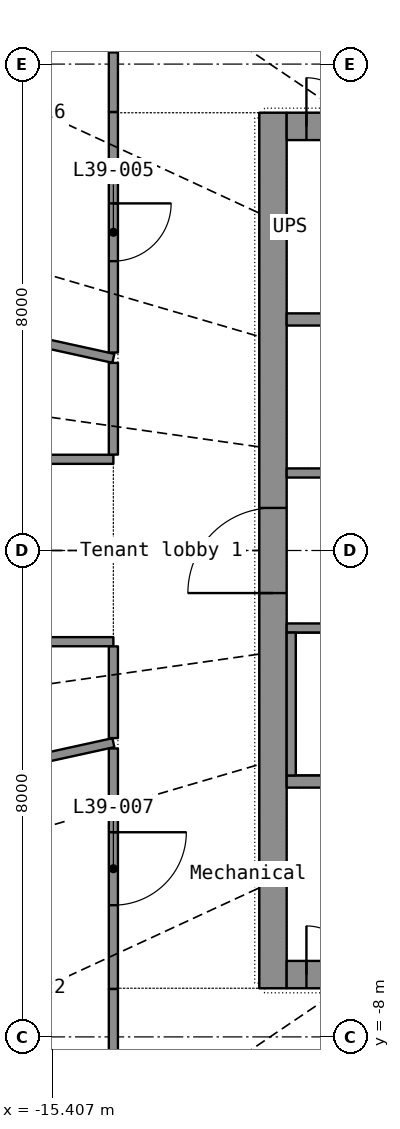
"""IFC4 building model, lengths in metres.
Left out: names, types, materials, properties, quantities, classifications, styles, units other than length and angle.
Written with IfcOpenShell. Run it as: python <this file> out.ifc"""

import sys

from ifc_helpers import new_model, si_unit, direction, frame, frame_2d, origin, place, context, subcontext, project, spatial, rectangle, extrude, element, fill, save


model = new_model("IFC4")
c1 = context("Model", 3, precision=1e-05, world=origin(), true_north=direction((0.0, 1.0)))
c2 = subcontext(c1, "Body", "Model", "MODEL_VIEW")
j1 = project(units=[si_unit("LENGTHUNIT", "METRE"), si_unit("PLANEANGLEUNIT", "RADIAN")], contexts=[c1])
p1 = place(None, origin())
s1 = spatial("IfcSite", under=j1, at=p1, CompositionType="ELEMENT")
p2 = place(p1, origin())
s2 = spatial("IfcBuilding", under=s1, at=p2, CompositionType="ELEMENT")
p3 = place(p2, frame((0.0, 0.0, 164.5)))
s3 = spatial("IfcBuildingStorey", under=s2, at=p3, CompositionType="ELEMENT", Elevation=164.5)
p4 = place(p3, frame((-11.775, -7.2, 0.0), z_axis=(0.0, 0.0, 1.0), x_axis=(0.0, 1.0, 0.0)))
e1 = element("IfcWall", 1, at=p4, inside=s3, PredefinedType="SHEAR", context=c2, shape_type="SweptSolid", body=[
    extrude(rectangle(XDim=14.4, YDim=0.45, at=frame_2d((7.2, 0.0))), origin(), (0.0, 0.0, 1.0), 3.3),
])
p5 = place(p4, frame((6.5, 0.0, 0.0)))
e2 = element("IfcOpeningElement", 2, at=p5, cuts=e1, PredefinedType="OPENING", context=c2, shape_type="SweptSolid", body=[
    extrude(rectangle(XDim=1.4, YDim=2.2, at=frame_2d((0.7, 1.1))), frame((0.0, 0.235, 0.0), z_axis=(0.0, -1.0, 0.0), x_axis=(1.0, 0.0, 0.0)), (0.0, 0.0, 1.0), 0.47),
])
p6 = place(p3, frame((-11.55, -6.975, 0.0), z_axis=(0.0, 0.0, 1.0), x_axis=(1.0, 0.0, 0.0)))
e3 = element("IfcWall", 3, at=p6, inside=s3, PredefinedType="SHEAR", context=c2, shape_type="SweptSolid", body=[
    extrude(rectangle(XDim=23.1, YDim=0.45, at=frame_2d((11.55, 0.0))), origin(), (0.0, 0.0, 1.0), 3.3),
])
p7 = place(p6, frame((20.0, 0.0, 0.0)))
e4 = element("IfcOpeningElement", 4, at=p7, cuts=e3, PredefinedType="OPENING", context=c2, shape_type="SweptSolid", body=[
    extrude(rectangle(XDim=1.1, YDim=2.2, at=frame_2d((0.55, 1.1))), frame((0.0, 0.235, 0.0), z_axis=(0.0, -1.0, 0.0), x_axis=(1.0, 0.0, 0.0)), (0.0, 0.0, 1.0), 0.47),
])
p8 = place(p6, frame((3.1, 0.0, 0.0)))
e5 = element("IfcOpeningElement", 5, at=p8, cuts=e3, PredefinedType="OPENING", context=c2, shape_type="SweptSolid", body=[
    extrude(rectangle(XDim=0.9, YDim=2.1, at=frame_2d((0.45, 1.05))), frame((0.0, 0.235, 0.0), z_axis=(0.0, -1.0, 0.0), x_axis=(1.0, 0.0, 0.0)), (0.0, 0.0, 1.0), 0.47),
])
p9 = place(p6, frame((9.1, 0.0, 0.0)))
e6 = element("IfcOpeningElement", 6, at=p9, cuts=e3, PredefinedType="OPENING", context=c2, shape_type="SweptSolid", body=[
    extrude(rectangle(XDim=0.9, YDim=2.1, at=frame_2d((0.45, 1.05))), frame((0.0, 0.235, 0.0), z_axis=(0.0, -1.0, 0.0), x_axis=(1.0, 0.0, 0.0)), (0.0, 0.0, 1.0), 0.47),
])
p10 = place(p6, frame((16.1, 0.0, 0.0)))
e7 = element("IfcOpeningElement", 7, at=p10, cuts=e3, PredefinedType="OPENING", context=c2, shape_type="SweptSolid", body=[
    extrude(rectangle(XDim=0.9, YDim=2.1, at=frame_2d((0.45, 1.05))), frame((0.0, 0.235, 0.0), z_axis=(0.0, -1.0, 0.0), x_axis=(1.0, 0.0, 0.0)), (0.0, 0.0, 1.0), 0.47),
])
p11 = place(p6, frame((0.325, 0.0, 0.0)))
e8 = element("IfcOpeningElement", 8, at=p11, cuts=e3, PredefinedType="OPENING", context=c2, shape_type="SweptSolid", body=[
    extrude(rectangle(XDim=0.8, YDim=2.05, at=frame_2d((0.4, 1.025))), frame((0.0, 0.235, 0.0), z_axis=(0.0, -1.0, 0.0), x_axis=(1.0, 0.0, 0.0)), (0.0, 0.0, 1.0), 0.47),
])
p12 = place(p6, frame((21.975, 0.0, 0.0)))
e9 = element("IfcOpeningElement", 9, at=p12, cuts=e3, PredefinedType="OPENING", context=c2, shape_type="SweptSolid", body=[
    extrude(rectangle(XDim=0.8, YDim=2.05, at=frame_2d((0.4, 1.025))), frame((0.0, 0.235, 0.0), z_axis=(0.0, -1.0, 0.0), x_axis=(1.0, 0.0, 0.0)), (0.0, 0.0, 1.0), 0.47),
])
p13 = place(p3, frame((-11.55, 6.975, 0.0), z_axis=(0.0, 0.0, 1.0), x_axis=(1.0, 0.0, 0.0)))
e10 = element("IfcWall", 10, at=p13, inside=s3, PredefinedType="SHEAR", context=c2, shape_type="SweptSolid", body=[
    extrude(rectangle(XDim=23.1, YDim=0.45, at=frame_2d((11.55, 0.0))), origin(), (0.0, 0.0, 1.0), 3.3),
])
p14 = place(p13, frame((2.0, 0.0, 0.0)))
e11 = element("IfcOpeningElement", 11, at=p14, cuts=e10, PredefinedType="OPENING", context=c2, shape_type="SweptSolid", body=[
    extrude(rectangle(XDim=1.1, YDim=2.2, at=frame_2d((0.55, 1.1))), frame((0.0, 0.235, 0.0), z_axis=(0.0, -1.0, 0.0), x_axis=(1.0, 0.0, 0.0)), (0.0, 0.0, 1.0), 0.47),
])
p15 = place(p13, frame((6.0, 0.0, 0.0)))
e12 = element("IfcOpeningElement", 12, at=p15, cuts=e10, PredefinedType="OPENING", context=c2, shape_type="SweptSolid", body=[
    extrude(rectangle(XDim=1.1, YDim=2.2, at=frame_2d((0.55, 1.1))), frame((0.0, 0.235, 0.0), z_axis=(0.0, -1.0, 0.0), x_axis=(1.0, 0.0, 0.0)), (0.0, 0.0, 1.0), 0.47),
])
p16 = place(p13, frame((8.0, 0.0, 0.0)))
e13 = element("IfcOpeningElement", 13, at=p16, cuts=e10, PredefinedType="OPENING", context=c2, shape_type="SweptSolid", body=[
    extrude(rectangle(XDim=1.1, YDim=2.2, at=frame_2d((0.55, 1.1))), frame((0.0, 0.235, 0.0), z_axis=(0.0, -1.0, 0.0), x_axis=(1.0, 0.0, 0.0)), (0.0, 0.0, 1.0), 0.47),
])
p17 = place(p13, frame((10.0, 0.0, 0.0)))
e14 = element("IfcOpeningElement", 14, at=p17, cuts=e10, PredefinedType="OPENING", context=c2, shape_type="SweptSolid", body=[
    extrude(rectangle(XDim=1.1, YDim=2.2, at=frame_2d((0.55, 1.1))), frame((0.0, 0.235, 0.0), z_axis=(0.0, -1.0, 0.0), x_axis=(1.0, 0.0, 0.0)), (0.0, 0.0, 1.0), 0.47),
])
p18 = place(p13, frame((12.0, 0.0, 0.0)))
e15 = element("IfcOpeningElement", 15, at=p18, cuts=e10, PredefinedType="OPENING", context=c2, shape_type="SweptSolid", body=[
    extrude(rectangle(XDim=1.1, YDim=2.2, at=frame_2d((0.55, 1.1))), frame((0.0, 0.235, 0.0), z_axis=(0.0, -1.0, 0.0), x_axis=(1.0, 0.0, 0.0)), (0.0, 0.0, 1.0), 0.47),
])
p19 = place(p13, frame((14.0, 0.0, 0.0)))
e16 = element("IfcOpeningElement", 16, at=p19, cuts=e10, PredefinedType="OPENING", context=c2, shape_type="SweptSolid", body=[
    extrude(rectangle(XDim=1.1, YDim=2.2, at=frame_2d((0.55, 1.1))), frame((0.0, 0.235, 0.0), z_axis=(0.0, -1.0, 0.0), x_axis=(1.0, 0.0, 0.0)), (0.0, 0.0, 1.0), 0.47),
])
p20 = place(p13, frame((16.0, 0.0, 0.0)))
e17 = element("IfcOpeningElement", 17, at=p20, cuts=e10, PredefinedType="OPENING", context=c2, shape_type="SweptSolid", body=[
    extrude(rectangle(XDim=1.1, YDim=2.2, at=frame_2d((0.55, 1.1))), frame((0.0, 0.235, 0.0), z_axis=(0.0, -1.0, 0.0), x_axis=(1.0, 0.0, 0.0)), (0.0, 0.0, 1.0), 0.47),
])
p21 = place(p13, frame((18.0, 0.0, 0.0)))
e18 = element("IfcOpeningElement", 18, at=p21, cuts=e10, PredefinedType="OPENING", context=c2, shape_type="SweptSolid", body=[
    extrude(rectangle(XDim=1.1, YDim=2.2, at=frame_2d((0.55, 1.1))), frame((0.0, 0.235, 0.0), z_axis=(0.0, -1.0, 0.0), x_axis=(1.0, 0.0, 0.0)), (0.0, 0.0, 1.0), 0.47),
])
p22 = place(p13, frame((20.0, 0.0, 0.0)))
e19 = element("IfcOpeningElement", 19, at=p22, cuts=e10, PredefinedType="OPENING", context=c2, shape_type="SweptSolid", body=[
    extrude(rectangle(XDim=1.1, YDim=2.2, at=frame_2d((0.55, 1.1))), frame((0.0, 0.235, 0.0), z_axis=(0.0, -1.0, 0.0), x_axis=(1.0, 0.0, 0.0)), (0.0, 0.0, 1.0), 0.47),
])
p23 = place(p13, frame((4.1, 0.0, 0.0)))
e20 = element("IfcOpeningElement", 20, at=p23, cuts=e10, PredefinedType="OPENING", context=c2, shape_type="SweptSolid", body=[
    extrude(rectangle(XDim=0.9, YDim=2.1, at=frame_2d((0.45, 1.05))), frame((0.0, 0.235, 0.0), z_axis=(0.0, -1.0, 0.0), x_axis=(1.0, 0.0, 0.0)), (0.0, 0.0, 1.0), 0.47),
])
p24 = place(p13, frame((0.325, 0.0, 0.0)))
e21 = element("IfcOpeningElement", 21, at=p24, cuts=e10, PredefinedType="OPENING", context=c2, shape_type="SweptSolid", body=[
    extrude(rectangle(XDim=0.8, YDim=2.05, at=frame_2d((0.4, 1.025))), frame((0.0, 0.235, 0.0), z_axis=(0.0, -1.0, 0.0), x_axis=(1.0, 0.0, 0.0)), (0.0, 0.0, 1.0), 0.47),
])
p25 = place(p13, frame((21.975, 0.0, 0.0)))
e22 = element("IfcOpeningElement", 22, at=p25, cuts=e10, PredefinedType="OPENING", context=c2, shape_type="SweptSolid", body=[
    extrude(rectangle(XDim=0.8, YDim=2.05, at=frame_2d((0.4, 1.025))), frame((0.0, 0.235, 0.0), z_axis=(0.0, -1.0, 0.0), x_axis=(1.0, 0.0, 0.0)), (0.0, 0.0, 1.0), 0.47),
])
for number, where, z_axis, x_axis in (
    (23, (-11.55, -3.8, 0.0), (0.0, 0.0, 1.0), (1.0, 0.0, 0.0)),
    (24, (-11.55, 3.8, 0.0), (0.0, 0.0, 1.0), (1.0, 0.0, 0.0)),
):
    element("IfcWall", number, at=place(p3, frame(where, z_axis=z_axis, x_axis=x_axis)), inside=s3, PredefinedType="SHEAR", context=c2, shape_type="SweptSolid", body=[
        extrude(rectangle(XDim=23.1, YDim=0.2, at=frame_2d((11.55, 0.0))), origin(), (0.0, 0.0, 1.0), 3.3),
    ])
p26 = place(p3, frame((-11.55, -1.275, 0.0), z_axis=(0.0, 0.0, 1.0), x_axis=(1.0, 0.0, 0.0)))
e25 = element("IfcWall", 25, at=p26, inside=s3, PredefinedType="SHEAR", context=c2, shape_type="SweptSolid", body=[
    extrude(rectangle(XDim=8.55, YDim=0.15, at=frame_2d((4.275, 0.0))), origin(), (0.0, 0.0, 1.0), 3.3),
])
p27 = place(p26, frame((5.4, 0.0, 0.0)))
e26 = element("IfcOpeningElement", 26, at=p27, cuts=e25, PredefinedType="OPENING", context=c2, shape_type="SweptSolid", body=[
    extrude(rectangle(XDim=1.1, YDim=2.15, at=frame_2d((0.55, 1.075))), frame((0.0, 0.085, 0.0), z_axis=(0.0, -1.0, 0.0), x_axis=(1.0, 0.0, 0.0)), (0.0, 0.0, 1.0), 0.17),
])
p28 = place(p26, frame((7.2, 0.0, 0.0)))
e27 = element("IfcOpeningElement", 27, at=p28, cuts=e25, PredefinedType="OPENING", context=c2, shape_type="SweptSolid", body=[
    extrude(rectangle(XDim=0.9, YDim=2.1, at=frame_2d((0.45, 1.05))), frame((0.0, 0.085, 0.0), z_axis=(0.0, -1.0, 0.0), x_axis=(1.0, 0.0, 0.0)), (0.0, 0.0, 1.0), 0.17),
])
p29 = place(p3, frame((-11.55, 1.275, 0.0), z_axis=(0.0, 0.0, 1.0), x_axis=(1.0, 0.0, 0.0)))
e28 = element("IfcWall", 28, at=p29, inside=s3, PredefinedType="PARTITIONING", context=c2, shape_type="SweptSolid", body=[
    extrude(rectangle(XDim=8.55, YDim=0.15, at=frame_2d((4.275, 0.0))), origin(), (0.0, 0.0, 1.0), 3.3),
])
p30 = place(p29, frame((1.308, 0.0, 0.0)))
e29 = element("IfcOpeningElement", 29, at=p30, cuts=e28, PredefinedType="OPENING", context=c2, shape_type="SweptSolid", body=[
    extrude(rectangle(XDim=0.85, YDim=2.1, at=frame_2d((0.425, 1.05))), frame((0.0, 0.085, 0.0), z_axis=(0.0, -1.0, 0.0), x_axis=(1.0, 0.0, 0.0)), (0.0, 0.0, 1.0), 0.17),
])
p31 = place(p29, frame((4.427, 0.0, 0.0)))
e30 = element("IfcOpeningElement", 30, at=p31, cuts=e28, PredefinedType="OPENING", context=c2, shape_type="SweptSolid", body=[
    extrude(rectangle(XDim=0.85, YDim=2.1, at=frame_2d((0.425, 1.05))), frame((0.0, 0.085, 0.0), z_axis=(0.0, -1.0, 0.0), x_axis=(1.0, 0.0, 0.0)), (0.0, 0.0, 1.0), 0.17),
])
p32 = place(p29, frame((6.945, 0.0, 0.0)))
e31 = element("IfcOpeningElement", 31, at=p32, cuts=e28, PredefinedType="OPENING", context=c2, shape_type="SweptSolid", body=[
    extrude(rectangle(XDim=0.9, YDim=2.1, at=frame_2d((0.45, 1.05))), frame((0.0, 0.085, 0.0), z_axis=(0.0, -1.0, 0.0), x_axis=(1.0, 0.0, 0.0)), (0.0, 0.0, 1.0), 0.17),
])
p33 = place(p3, frame((-11.475, -3.7, 0.0), z_axis=(0.0, 0.0, 1.0), x_axis=(0.0, 1.0, 0.0)))
e32 = element("IfcWall", 32, at=p33, inside=s3, PredefinedType="SHEAR", context=c2, shape_type="SweptSolid", body=[
    extrude(rectangle(XDim=2.35, YDim=0.15, at=frame_2d((1.175, 0.0))), origin(), (0.0, 0.0, 1.0), 3.3),
])
p34 = place(p3, frame((-22.981, 5.044, 0.0), z_axis=(0.0, 0.0, 1.0), x_axis=(0.976745479, -0.214402122, 0.0)))
e33 = element("IfcWall", 33, at=p34, inside=s3, PredefinedType="PARTITIONING", context=c2, shape_type="SweptSolid", body=[
    extrude(rectangle(XDim=8.785, YDim=0.15, at=frame_2d((4.393, 0.0))), origin(), (0.0, 0.0, 1.0), 2.4),
])
p35 = place(p3, frame((-22.979, -5.044, 0.0), z_axis=(0.0, 0.0, 1.0), x_axis=(0.976744911, 0.214404708, 0.0)))
e34 = element("IfcWall", 34, at=p35, inside=s3, PredefinedType="PARTITIONING", context=c2, shape_type="SweptSolid", body=[
    extrude(rectangle(XDim=8.784, YDim=0.15, at=frame_2d((4.392, 0.0))), origin(), (0.0, 0.0, 1.0), 2.4),
])
p36 = place(p3, frame((-21.202, -1.5, 0.0), z_axis=(0.0, 0.0, 1.0), x_axis=(1.0, 0.0, 0.0)))
e35 = element("IfcWall", 35, at=p36, inside=s3, PredefinedType="PARTITIONING", context=c2, shape_type="SweptSolid", body=[
    extrude(rectangle(XDim=6.802, YDim=0.15, at=frame_2d((3.401, 0.0))), origin(), (0.0, 0.0, 1.0), 2.4),
])
p37 = place(p36, frame((2.801, 0.0, 0.0)))
e36 = element("IfcOpeningElement", 36, at=p37, cuts=e35, PredefinedType="OPENING", context=c2, shape_type="SweptSolid", body=[
    extrude(rectangle(XDim=1.2, YDim=2.2, at=frame_2d((0.6, 1.1))), frame((0.0, 0.085, 0.0), z_axis=(0.0, -1.0, 0.0), x_axis=(1.0, 0.0, 0.0)), (0.0, 0.0, 1.0), 0.17),
])
p38 = place(p3, frame((-14.4, 1.5, 0.0), z_axis=(0.0, 0.0, 1.0), x_axis=(-1.0, 0.0, 0.0)))
e37 = element("IfcWall", 37, at=p38, inside=s3, PredefinedType="PARTITIONING", context=c2, shape_type="SweptSolid", body=[
    extrude(rectangle(XDim=6.802, YDim=0.15, at=frame_2d((3.401, 0.0))), origin(), (0.0, 0.0, 1.0), 2.4),
])
p39 = place(p3, frame((-19.483, 11.175, 0.0), z_axis=(0.0, 0.0, 1.0), x_axis=(0.867447243, -0.497529176, 0.0)))
e38 = element("IfcWall", 38, at=p39, inside=s3, PredefinedType="PARTITIONING", context=c2, shape_type="SweptSolid", body=[
    extrude(rectangle(XDim=5.86, YDim=0.15, at=frame_2d((2.93, 0.0))), origin(), (0.0, 0.0, 1.0), 2.4),
])
p40 = place(p3, frame((-14.4, -3.256, 0.0), z_axis=(0.0, 0.0, 1.0), x_axis=(0.0, -1.0, 0.0)))
e39 = element("IfcWall", 39, at=p40, inside=s3, PredefinedType="PARTITIONING", context=c2, shape_type="SweptSolid", body=[
    extrude(rectangle(XDim=3.956, YDim=0.15, at=frame_2d((1.978, 0.0))), origin(), (0.0, 0.0, 1.0), 2.4),
])
p41 = place(p40, frame((1.378, 0.0, 0.0)))
e40 = element("IfcOpeningElement", 40, at=p41, cuts=e39, PredefinedType="OPENING", context=c2, shape_type="SweptSolid", body=[
    extrude(rectangle(XDim=1.2, YDim=2.2, at=frame_2d((0.6, 1.1))), frame((0.0, 0.085, 0.0), z_axis=(0.0, -1.0, 0.0), x_axis=(1.0, 0.0, 0.0)), (0.0, 0.0, 1.0), 0.17),
])
p42 = place(p3, frame((-14.4, 7.212, 0.0), z_axis=(0.0, 0.0, 1.0), x_axis=(0.0, -1.0, 0.0)))
e41 = element("IfcWall", 41, at=p42, inside=s3, PredefinedType="PARTITIONING", context=c2, shape_type="SweptSolid", body=[
    extrude(rectangle(XDim=3.956, YDim=0.15, at=frame_2d((1.978, 0.0))), origin(), (0.0, 0.0, 1.0), 2.4),
])
p43 = place(p42, frame((1.503, 0.0, 0.0)))
e42 = element("IfcOpeningElement", 42, at=p43, cuts=e41, PredefinedType="OPENING", context=c2, shape_type="SweptSolid", body=[
    extrude(rectangle(XDim=0.95, YDim=2.15, at=frame_2d((0.475, 1.075))), frame((0.0, 0.085, 0.0), z_axis=(0.0, -1.0, 0.0), x_axis=(1.0, 0.0, 0.0)), (0.0, 0.0, 1.0), 0.17),
])
p44 = place(p3, frame((-14.4, -7.213, 0.0), z_axis=(0.0, 0.0, 1.0), x_axis=(0.0, -1.0, 0.0)))
e43 = element("IfcWall", 43, at=p44, inside=s3, PredefinedType="PARTITIONING", context=c2, shape_type="SweptSolid", body=[
    extrude(rectangle(XDim=2.31, YDim=0.15, at=frame_2d((1.155, 0.0))), origin(), (0.0, 0.0, 1.0), 2.4),
])
for number, where, z_axis, x_axis in (
    (44, (-14.4, -1.577, 0.0), (0.0, 0.0, 1.0), (0.0, -1.0, 0.0)),
    (45, (-14.4, 3.085, 0.0), (0.0, 0.0, 1.0), (0.0, -1.0, 0.0)),
):
    element("IfcWall", number, at=place(p3, frame(where, z_axis=z_axis, x_axis=x_axis)), inside=s3, PredefinedType="PARTITIONING", context=c2, shape_type="SweptSolid", body=[
        extrude(rectangle(XDim=1.508, YDim=0.15, at=frame_2d((0.754, 0.0))), origin(), (0.0, 0.0, 1.0), 2.4),
    ])
p45 = place(p3, frame((-14.4, 8.192, 0.0), z_axis=(0.0, 0.0, 1.0), x_axis=(0.0, -1.0, 0.0)))
e46 = element("IfcWall", 46, at=p45, inside=s3, PredefinedType="PARTITIONING", context=c2, shape_type="SweptSolid", body=[
    extrude(rectangle(XDim=0.979, YDim=0.15, at=frame_2d((0.49, 0.0))), origin(), (0.0, 0.0, 1.0), 2.4),
])
p46 = place(p11, origin())
e47 = element("IfcDoor", 47, at=p46, inside=s3, OperationType="SINGLE_SWING_LEFT", PredefinedType="DOOR", context=c2, shape_type="SweptSolid", body=[
    extrude(rectangle(XDim=0.8, YDim=2.05, at=frame_2d((0.4, 1.025))), frame((0.0, 0.025, 0.0), z_axis=(0.0, -1.0, 0.0), x_axis=(1.0, 0.0, 0.0)), (0.0, 0.0, 1.0), 0.05),
])
fill(e8, e47)
p47 = place(p24, origin())
e48 = element("IfcDoor", 48, at=p47, inside=s3, OperationType="SINGLE_SWING_LEFT", PredefinedType="DOOR", context=c2, shape_type="SweptSolid", body=[
    extrude(rectangle(XDim=0.8, YDim=2.05, at=frame_2d((0.4, 1.025))), frame((0.0, 0.025, 0.0), z_axis=(0.0, -1.0, 0.0), x_axis=(1.0, 0.0, 0.0)), (0.0, 0.0, 1.0), 0.05),
])
fill(e21, e48)
p48 = place(p5, origin())
e49 = element("IfcDoor", 49, at=p48, inside=s3, OperationType="DOUBLE_DOOR_SINGLE_SWING", PredefinedType="DOOR", context=c2, shape_type="SweptSolid", body=[
    extrude(rectangle(XDim=1.4, YDim=2.2, at=frame_2d((0.7, 1.1))), frame((0.0, 0.025, 0.0), z_axis=(0.0, -1.0, 0.0), x_axis=(1.0, 0.0, 0.0)), (0.0, 0.0, 1.0), 0.05),
])
fill(e2, e49)
p49 = place(p43, origin())
e50 = element("IfcDoor", 50, at=p49, inside=s3, OperationType="SINGLE_SWING_LEFT", PredefinedType="DOOR", context=c2, shape_type="SweptSolid", body=[
    extrude(rectangle(XDim=0.95, YDim=2.15, at=frame_2d((0.475, 1.075))), frame((0.0, 0.025, 0.0), z_axis=(0.0, -1.0, 0.0), x_axis=(1.0, 0.0, 0.0)), (0.0, 0.0, 1.0), 0.05),
])
fill(e42, e50)
p50 = place(p41, origin())
e51 = element("IfcDoor", 51, at=p50, inside=s3, OperationType="DOUBLE_DOOR_SINGLE_SWING", PredefinedType="DOOR", context=c2, shape_type="SweptSolid", body=[
    extrude(rectangle(XDim=1.2, YDim=2.2, at=frame_2d((0.6, 1.1))), frame((0.0, 0.025, 0.0), z_axis=(0.0, -1.0, 0.0), x_axis=(1.0, 0.0, 0.0)), (0.0, 0.0, 1.0), 0.05),
])
fill(e40, e51)
save(model, sys.argv[1])
